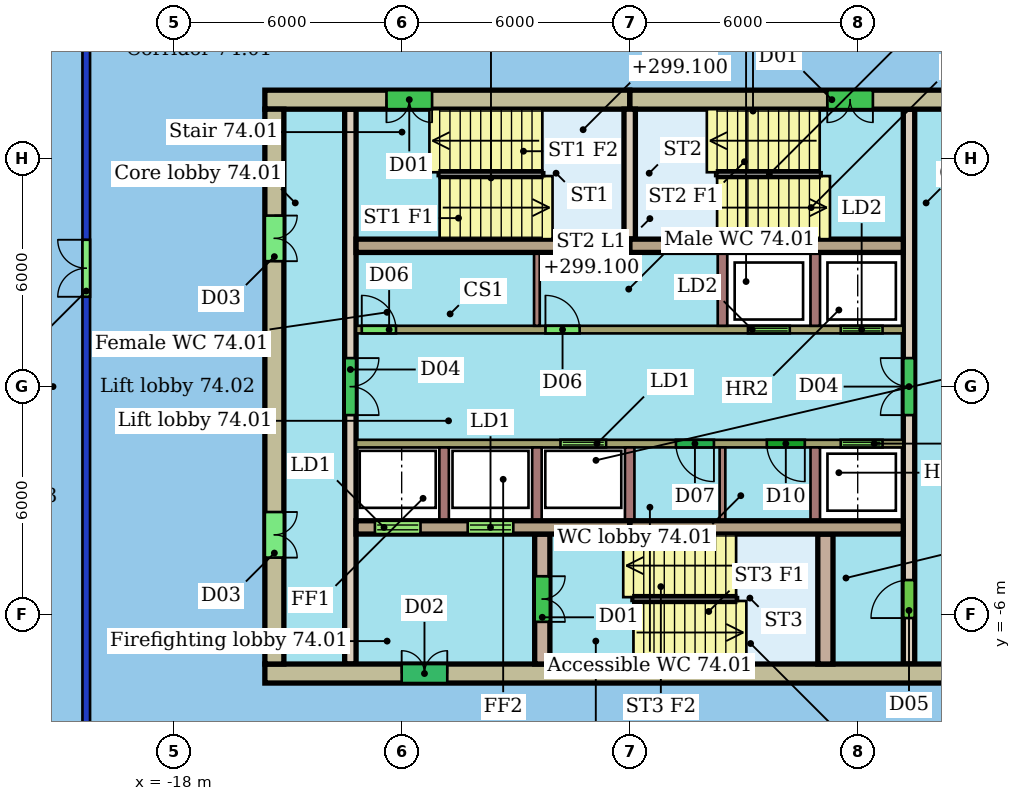
"""IFC4 building model, lengths in metres.
Left out: names, types, materials, properties, quantities, classifications, styles, units other than length and angle.
Written with IfcOpenShell. Run it as: python <this file> out.ifc"""

import sys

from ifc_helpers import new_model, si_unit, direction, frame, frame_2d, origin, place, context, subcontext, project, spatial, rectangle, extrude, element, fill, save


model = new_model("IFC4")
c1 = context("Model", 3, precision=1e-05, world=origin(), true_north=direction((0.0, 1.0)))
c2 = subcontext(c1, "Body", "Model", "MODEL_VIEW")
j1 = project(units=[si_unit("LENGTHUNIT", "METRE"), si_unit("PLANEANGLEUNIT", "RADIAN")], contexts=[c1])
p1 = place(None, origin())
s1 = spatial("IfcSite", under=j1, at=p1, CompositionType="ELEMENT")
p2 = place(p1, origin())
s2 = spatial("IfcBuilding", under=s1, at=p2, CompositionType="ELEMENT")
p3 = place(p2, frame((0.0, 0.0, 297.3)))
s3 = spatial("IfcBuildingStorey", under=s2, at=p3, CompositionType="ELEMENT", Elevation=297.3)
p4 = place(p3, frame((-20.3, -9.8, 0.0), z_axis=(0.0, 0.0, 1.0), x_axis=(0.0, 1.0, 0.0)))
e1 = element("IfcWall", 1, at=p4, inside=s3, PredefinedType="PARTITIONING", context=c2, shape_type="SweptSolid", body=[
    extrude(rectangle(XDim=19.6, YDim=0.2, at=frame_2d((9.8, 0.0))), origin(), (0.0, 0.0, 1.0), 3.1),
])
p5 = place(p4, frame((12.164, 0.0, 0.0)))
e2 = element("IfcOpeningElement", 2, at=p5, cuts=e1, PredefinedType="OPENING", context=c2, shape_type="SweptSolid", body=[
    extrude(rectangle(XDim=1.5, YDim=2.4, at=frame_2d((0.75, 1.2))), frame((0.0, 0.11, 0.0), z_axis=(0.0, -1.0, 0.0), x_axis=(1.0, 0.0, 0.0)), (0.0, 0.0, 1.0), 0.22),
])
p6 = place(p3, frame((3.6, 7.55, 0.0), z_axis=(0.0, 0.0, 1.0), x_axis=(-1.0, 0.0, 0.0)))
e3 = element("IfcWall", 3, at=p6, inside=s3, PredefinedType="SHEAR", context=c2, shape_type="SweptSolid", body=[
    extrude(rectangle(XDim=9.6, YDim=0.5, at=frame_2d((4.8, 0.0))), origin(), (0.0, 0.0, 1.0), 3.3),
])
p7 = place(p6, frame((3.2, 0.0, 0.0)))
e4 = element("IfcOpeningElement", 4, at=p7, cuts=e3, PredefinedType="OPENING", context=c2, shape_type="SweptSolid", body=[
    extrude(rectangle(XDim=1.2, YDim=2.1, at=frame_2d((0.6, 1.05))), frame((0.0, 0.26, 0.0), z_axis=(0.0, -1.0, 0.0), x_axis=(1.0, 0.0, 0.0)), (0.0, 0.0, 1.0), 0.52),
])
p8 = place(p3, frame((-6.0, 7.55, 0.0), z_axis=(0.0, 0.0, 1.0), x_axis=(-1.0, 0.0, 0.0)))
e5 = element("IfcWall", 5, at=p8, inside=s3, PredefinedType="SHEAR", context=c2, shape_type="SweptSolid", body=[
    extrude(rectangle(XDim=9.6, YDim=0.5, at=frame_2d((4.8, 0.0))), origin(), (0.0, 0.0, 1.0), 3.3),
])
p9 = place(p8, frame((5.2, 0.0, 0.0)))
e6 = element("IfcOpeningElement", 6, at=p9, cuts=e5, PredefinedType="OPENING", context=c2, shape_type="SweptSolid", body=[
    extrude(rectangle(XDim=1.2, YDim=2.1, at=frame_2d((0.6, 1.05))), frame((0.0, 0.26, 0.0), z_axis=(0.0, -1.0, 0.0), x_axis=(1.0, 0.0, 0.0)), (0.0, 0.0, 1.0), 0.52),
])
p10 = place(p3, frame((-15.6, -7.55, 0.0), z_axis=(0.0, 0.0, 1.0), x_axis=(1.0, 0.0, 0.0)))
e7 = element("IfcWall", 7, at=p10, inside=s3, PredefinedType="SHEAR", context=c2, shape_type="SweptSolid", body=[
    extrude(rectangle(XDim=19.2, YDim=0.5, at=frame_2d((9.6, 0.0))), origin(), (0.0, 0.0, 1.0), 3.3),
])
p11 = place(p10, frame((3.6, 0.0, 0.0)))
e8 = element("IfcOpeningElement", 8, at=p11, cuts=e7, PredefinedType="OPENING", context=c2, shape_type="SweptSolid", body=[
    extrude(rectangle(XDim=1.2, YDim=2.1, at=frame_2d((0.6, 1.05))), frame((0.0, 0.26, 0.0), z_axis=(0.0, -1.0, 0.0), x_axis=(1.0, 0.0, 0.0)), (0.0, 0.0, 1.0), 0.52),
])
p12 = place(p3, frame((-15.35, 7.3, 0.0), z_axis=(0.0, 0.0, 1.0), x_axis=(0.0, -1.0, 0.0)))
e9 = element("IfcWall", 9, at=p12, inside=s3, PredefinedType="SHEAR", context=c2, shape_type="SweptSolid", body=[
    extrude(rectangle(XDim=14.6, YDim=0.5, at=frame_2d((7.3, 0.0))), origin(), (0.0, 0.0, 1.0), 3.3),
])
p13 = place(p12, frame((10.6, 0.0, 0.0)))
e10 = element("IfcOpeningElement", 10, at=p13, cuts=e9, PredefinedType="OPENING", context=c2, shape_type="SweptSolid", body=[
    extrude(rectangle(XDim=1.2, YDim=2.1, at=frame_2d((0.6, 1.05))), frame((0.0, 0.26, 0.0), z_axis=(0.0, -1.0, 0.0), x_axis=(1.0, 0.0, 0.0)), (0.0, 0.0, 1.0), 0.52),
])
p14 = place(p12, frame((2.8, 0.0, 0.0)))
e11 = element("IfcOpeningElement", 11, at=p14, cuts=e9, PredefinedType="OPENING", context=c2, shape_type="SweptSolid", body=[
    extrude(rectangle(XDim=1.2, YDim=2.1, at=frame_2d((0.6, 1.05))), frame((0.0, 0.26, 0.0), z_axis=(0.0, -1.0, 0.0), x_axis=(1.0, 0.0, 0.0)), (0.0, 0.0, 1.0), 0.52),
])
for number, where, z_axis, x_axis in (
    (12, (-13.2, 3.705, 0.0), (0.0, 0.0, 1.0), (1.0, 0.0, 0.0)),
    (13, (-6.0, 3.705, 0.0), (0.0, 0.0, 1.0), (1.0, 0.0, 0.0)),
):
    element("IfcWall", number, at=place(p3, frame(where, z_axis=z_axis, x_axis=x_axis)), inside=s3, PredefinedType="SHEAR", context=c2, shape_type="SweptSolid", body=[
        extrude(rectangle(XDim=7.2, YDim=0.35, at=frame_2d((3.6, 0.0))), origin(), (0.0, 0.0, 1.0), 3.3),
    ])
p15 = place(p3, frame((-13.2, -3.705, 0.0), z_axis=(0.0, 0.0, 1.0), x_axis=(1.0, 0.0, 0.0)))
e14 = element("IfcWall", 14, at=p15, inside=s3, PredefinedType="SHEAR", context=c2, shape_type="SweptSolid", body=[
    extrude(rectangle(XDim=7.2, YDim=0.35, at=frame_2d((3.6, 0.0))), origin(), (0.0, 0.0, 1.0), 3.3),
])
p16 = place(p15, frame((0.496, 0.0, 0.0)))
e15 = element("IfcOpeningElement", 15, at=p16, cuts=e14, PredefinedType="OPENING", context=c2, shape_type="SweptSolid", body=[
    extrude(rectangle(XDim=1.2, YDim=2.1, at=frame_2d((0.6, 1.05))), frame((0.0, 0.185, 0.0), z_axis=(0.0, -1.0, 0.0), x_axis=(1.0, 0.0, 0.0)), (0.0, 0.0, 1.0), 0.37),
])
p17 = place(p15, frame((2.938, 0.0, 0.0)))
e16 = element("IfcOpeningElement", 16, at=p17, cuts=e14, PredefinedType="OPENING", context=c2, shape_type="SweptSolid", body=[
    extrude(rectangle(XDim=1.2, YDim=2.1, at=frame_2d((0.6, 1.05))), frame((0.0, 0.185, 0.0), z_axis=(0.0, -1.0, 0.0), x_axis=(1.0, 0.0, 0.0)), (0.0, 0.0, 1.0), 0.37),
])
p18 = place(p3, frame((-6.0, -3.705, 0.0), z_axis=(0.0, 0.0, 1.0), x_axis=(1.0, 0.0, 0.0)))
e17 = element("IfcWall", 17, at=p18, inside=s3, PredefinedType="SHEAR", context=c2, shape_type="SweptSolid", body=[
    extrude(rectangle(XDim=7.2, YDim=0.35, at=frame_2d((3.6, 0.0))), origin(), (0.0, 0.0, 1.0), 3.3),
])
p19 = place(p3, frame((-13.35, 7.3, 0.0), z_axis=(0.0, 0.0, 1.0), x_axis=(0.0, -1.0, 0.0)))
e18 = element("IfcWall", 18, at=p19, inside=s3, PredefinedType="SHEAR", context=c2, shape_type="SweptSolid", body=[
    extrude(rectangle(XDim=14.6, YDim=0.3, at=frame_2d((7.3, 0.0))), origin(), (0.0, 0.0, 1.0), 3.3),
])
p20 = place(p19, frame((6.55, 0.0, 0.0)))
e19 = element("IfcOpeningElement", 19, at=p20, cuts=e18, PredefinedType="OPENING", context=c2, shape_type="SweptSolid", body=[
    extrude(rectangle(XDim=1.5, YDim=2.1, at=frame_2d((0.75, 1.05))), frame((0.0, 0.16, 0.0), z_axis=(0.0, -1.0, 0.0), x_axis=(1.0, 0.0, 0.0)), (0.0, 0.0, 1.0), 0.32),
])
p21 = place(p3, frame((1.35, -7.3, 0.0), z_axis=(0.0, 0.0, 1.0), x_axis=(0.0, 1.0, 0.0)))
e20 = element("IfcWall", 20, at=p21, inside=s3, PredefinedType="SHEAR", context=c2, shape_type="SweptSolid", body=[
    extrude(rectangle(XDim=14.6, YDim=0.3, at=frame_2d((7.3, 0.0))), origin(), (0.0, 0.0, 1.0), 3.3),
])
p22 = place(p21, frame((1.21, 0.0, 0.0)))
e21 = element("IfcOpeningElement", 21, at=p22, cuts=e20, PredefinedType="OPENING", context=c2, shape_type="SweptSolid", body=[
    extrude(rectangle(XDim=1.0, YDim=2.1, at=frame_2d((0.5, 1.05))), frame((0.0, 0.16, 0.0), z_axis=(0.0, -1.0, 0.0), x_axis=(1.0, 0.0, 0.0)), (0.0, 0.0, 1.0), 0.32),
])
p23 = place(p21, frame((6.55, 0.0, 0.0)))
e22 = element("IfcOpeningElement", 22, at=p23, cuts=e20, PredefinedType="OPENING", context=c2, shape_type="SweptSolid", body=[
    extrude(rectangle(XDim=1.5, YDim=2.1, at=frame_2d((0.75, 1.05))), frame((0.0, 0.16, 0.0), z_axis=(0.0, -1.0, 0.0), x_axis=(1.0, 0.0, 0.0)), (0.0, 0.0, 1.0), 0.32),
])
p24 = place(p3, frame((-13.2, 1.5, 0.0), z_axis=(0.0, 0.0, 1.0), x_axis=(1.0, 0.0, 0.0)))
e23 = element("IfcWall", 23, at=p24, inside=s3, PredefinedType="SHEAR", context=c2, shape_type="SweptSolid", body=[
    extrude(rectangle(XDim=14.4, YDim=0.2, at=frame_2d((7.2, 0.0))), origin(), (0.0, 0.0, 1.0), 3.3),
])
p25 = place(p24, frame((10.312, 0.0, 0.0)))
e24 = element("IfcOpeningElement", 24, at=p25, cuts=e23, PredefinedType="OPENING", context=c2, shape_type="SweptSolid", body=[
    extrude(rectangle(XDim=1.1, YDim=2.1, at=frame_2d((0.55, 1.05))), frame((0.0, 0.11, 0.0), z_axis=(0.0, -1.0, 0.0), x_axis=(1.0, 0.0, 0.0)), (0.0, 0.0, 1.0), 0.22),
])
p26 = place(p24, frame((12.754, 0.0, 0.0)))
e25 = element("IfcOpeningElement", 25, at=p26, cuts=e23, PredefinedType="OPENING", context=c2, shape_type="SweptSolid", body=[
    extrude(rectangle(XDim=1.1, YDim=2.1, at=frame_2d((0.55, 1.05))), frame((0.0, 0.11, 0.0), z_axis=(0.0, -1.0, 0.0), x_axis=(1.0, 0.0, 0.0)), (0.0, 0.0, 1.0), 0.22),
])
p27 = place(p24, frame((0.15, 0.0, 0.0)))
e26 = element("IfcOpeningElement", 26, at=p27, cuts=e23, PredefinedType="OPENING", context=c2, shape_type="SweptSolid", body=[
    extrude(rectangle(XDim=0.9, YDim=2.1, at=frame_2d((0.45, 1.05))), frame((0.0, 0.11, 0.0), z_axis=(0.0, -1.0, 0.0), x_axis=(1.0, 0.0, 0.0)), (0.0, 0.0, 1.0), 0.22),
])
p28 = place(p24, frame((4.983, 0.0, 0.0)))
e27 = element("IfcOpeningElement", 27, at=p28, cuts=e23, PredefinedType="OPENING", context=c2, shape_type="SweptSolid", body=[
    extrude(rectangle(XDim=0.9, YDim=2.1, at=frame_2d((0.45, 1.05))), frame((0.0, 0.11, 0.0), z_axis=(0.0, -1.0, 0.0), x_axis=(1.0, 0.0, 0.0)), (0.0, 0.0, 1.0), 0.22),
])
p29 = place(p3, frame((1.2, -1.5, 0.0), z_axis=(0.0, 0.0, 1.0), x_axis=(-1.0, 0.0, 0.0)))
e28 = element("IfcWall", 28, at=p29, inside=s3, PredefinedType="SHEAR", context=c2, shape_type="SweptSolid", body=[
    extrude(rectangle(XDim=14.4, YDim=0.2, at=frame_2d((7.2, 0.0))), origin(), (0.0, 0.0, 1.0), 3.3),
])
p30 = place(p29, frame((7.821, 0.0, 0.0)))
e29 = element("IfcOpeningElement", 29, at=p30, cuts=e28, PredefinedType="OPENING", context=c2, shape_type="SweptSolid", body=[
    extrude(rectangle(XDim=1.2, YDim=2.1, at=frame_2d((0.6, 1.05))), frame((0.0, 0.11, 0.0), z_axis=(0.0, -1.0, 0.0), x_axis=(1.0, 0.0, 0.0)), (0.0, 0.0, 1.0), 0.22),
])
p31 = place(p29, frame((0.546, 0.0, 0.0)))
e30 = element("IfcOpeningElement", 30, at=p31, cuts=e28, PredefinedType="OPENING", context=c2, shape_type="SweptSolid", body=[
    extrude(rectangle(XDim=1.1, YDim=2.1, at=frame_2d((0.55, 1.05))), frame((0.0, 0.11, 0.0), z_axis=(0.0, -1.0, 0.0), x_axis=(1.0, 0.0, 0.0)), (0.0, 0.0, 1.0), 0.22),
])
p32 = place(p29, frame((4.983, 0.0, 0.0)))
e31 = element("IfcOpeningElement", 31, at=p32, cuts=e28, PredefinedType="OPENING", context=c2, shape_type="SweptSolid", body=[
    extrude(rectangle(XDim=1.0, YDim=2.1, at=frame_2d((0.5, 1.05))), frame((0.0, 0.11, 0.0), z_axis=(0.0, -1.0, 0.0), x_axis=(1.0, 0.0, 0.0)), (0.0, 0.0, 1.0), 0.22),
])
p33 = place(p29, frame((2.592, 0.0, 0.0)))
e32 = element("IfcOpeningElement", 32, at=p33, cuts=e28, PredefinedType="OPENING", context=c2, shape_type="SweptSolid", body=[
    extrude(rectangle(XDim=1.0, YDim=2.1, at=frame_2d((0.5, 1.05))), frame((0.0, 0.11, 0.0), z_axis=(0.0, -1.0, 0.0), x_axis=(1.0, 0.0, 0.0)), (0.0, 0.0, 1.0), 0.22),
])
p34 = place(p3, frame((-8.3, -3.88, 0.0), z_axis=(0.0, 0.0, 1.0), x_axis=(0.0, -1.0, 0.0)))
e33 = element("IfcWall", 33, at=p34, inside=s3, PredefinedType="SHEAR", context=c2, shape_type="SweptSolid", body=[
    extrude(rectangle(XDim=3.42, YDim=0.4, at=frame_2d((1.71, 0.0))), origin(), (0.0, 0.0, 1.0), 3.3),
])
p35 = place(p34, frame((1.11, 0.0, 0.0)))
e34 = element("IfcOpeningElement", 34, at=p35, cuts=e33, PredefinedType="OPENING", context=c2, shape_type="SweptSolid", body=[
    extrude(rectangle(XDim=1.2, YDim=2.1, at=frame_2d((0.6, 1.05))), frame((0.0, 0.21, 0.0), z_axis=(0.0, -1.0, 0.0), x_axis=(1.0, 0.0, 0.0)), (0.0, 0.0, 1.0), 0.42),
])
p36 = place(p3, frame((-0.85, -3.88, 0.0), z_axis=(0.0, 0.0, 1.0), x_axis=(0.0, -1.0, 0.0)))
e35 = element("IfcWall", 35, at=p36, inside=s3, PredefinedType="SHEAR", context=c2, shape_type="SweptSolid", body=[
    extrude(rectangle(XDim=3.42, YDim=0.4, at=frame_2d((1.71, 0.0))), origin(), (0.0, 0.0, 1.0), 3.3),
])
p37 = place(p3, frame((-6.0, 3.88, 0.0), z_axis=(0.0, 0.0, 1.0), x_axis=(0.0, 1.0, 0.0)))
e36 = element("IfcWall", 36, at=p37, inside=s3, PredefinedType="SHEAR", context=c2, shape_type="SweptSolid", body=[
    extrude(rectangle(XDim=3.42, YDim=0.3, at=frame_2d((1.71, 0.0))), origin(), (0.0, 0.0, 1.0), 3.3),
])
for number, where, z_axis, x_axis in (
    (37, (-3.558, 1.6, 0.0), (0.0, 0.0, 1.0), (0.0, 1.0, 0.0)),
    (38, (-1.117, 1.6, 0.0), (0.0, 0.0, 1.0), (0.0, 1.0, 0.0)),
):
    element("IfcWall", number, at=place(p3, frame(where, z_axis=z_axis, x_axis=x_axis)), inside=s3, PredefinedType="SHEAR", context=c2, shape_type="SweptSolid", body=[
        extrude(rectangle(XDim=1.93, YDim=0.25, at=frame_2d((0.965, 0.0))), origin(), (0.0, 0.0, 1.0), 3.3),
    ])
p38 = place(p3, frame((-8.442, 1.6, 0.0), z_axis=(0.0, 0.0, 1.0), x_axis=(0.0, 1.0, 0.0)))
e39 = element("IfcWall", 39, at=p38, inside=s3, PredefinedType="PARTITIONING", context=c2, shape_type="SweptSolid", body=[
    extrude(rectangle(XDim=1.93, YDim=0.15, at=frame_2d((0.965, 0.0))), origin(), (0.0, 0.0, 1.0), 3.3),
])
for number, where, z_axis, x_axis in (
    (40, (-10.883, -1.6, 0.0), (0.0, 0.0, 1.0), (0.0, -1.0, 0.0)),
    (41, (-8.442, -1.6, 0.0), (0.0, 0.0, 1.0), (0.0, -1.0, 0.0)),
    (42, (-6.0, -1.6, 0.0), (0.0, 0.0, 1.0), (0.0, -1.0, 0.0)),
    (43, (-1.117, -1.6, 0.0), (0.0, 0.0, 1.0), (0.0, -1.0, 0.0)),
):
    element("IfcWall", number, at=place(p3, frame(where, z_axis=z_axis, x_axis=x_axis)), inside=s3, PredefinedType="SHEAR", context=c2, shape_type="SweptSolid", body=[
        extrude(rectangle(XDim=1.93, YDim=0.25, at=frame_2d((0.965, 0.0))), origin(), (0.0, 0.0, 1.0), 3.3),
    ])
p39 = place(p3, frame((-3.558, -1.6, 0.0), z_axis=(0.0, 0.0, 1.0), x_axis=(0.0, -1.0, 0.0)))
e44 = element("IfcWall", 44, at=p39, inside=s3, PredefinedType="PARTITIONING", context=c2, shape_type="SweptSolid", body=[
    extrude(rectangle(XDim=1.93, YDim=0.15, at=frame_2d((0.965, 0.0))), origin(), (0.0, 0.0, 1.0), 3.3),
])
p40 = place(p5, origin())
e45 = element("IfcDoor", 45, at=p40, inside=s3, OperationType="DOUBLE_DOOR_SINGLE_SWING", PredefinedType="DOOR", context=c2, shape_type="SweptSolid", body=[
    extrude(rectangle(XDim=1.5, YDim=2.4, at=frame_2d((0.75, 1.2))), frame((0.0, 0.025, 0.0), z_axis=(0.0, -1.0, 0.0), x_axis=(1.0, 0.0, 0.0)), (0.0, 0.0, 1.0), 0.05),
])
fill(e2, e45)
p41 = place(p7, origin())
e46 = element("IfcDoor", 46, at=p41, inside=s3, OperationType="DOUBLE_DOOR_SINGLE_SWING", PredefinedType="NOTDEFINED", context=c2, shape_type="SweptSolid", body=[
    extrude(rectangle(XDim=1.2, YDim=2.1, at=frame_2d((0.6, 1.05))), frame((0.0, 0.025, 0.0), z_axis=(0.0, -1.0, 0.0), x_axis=(1.0, 0.0, 0.0)), (0.0, 0.0, 1.0), 0.05),
])
fill(e4, e46)
p42 = place(p9, origin())
e47 = element("IfcDoor", 47, at=p42, inside=s3, OperationType="DOUBLE_DOOR_SINGLE_SWING", PredefinedType="NOTDEFINED", context=c2, shape_type="SweptSolid", body=[
    extrude(rectangle(XDim=1.2, YDim=2.1, at=frame_2d((0.6, 1.05))), frame((0.0, 0.025, 0.0), z_axis=(0.0, -1.0, 0.0), x_axis=(1.0, 0.0, 0.0)), (0.0, 0.0, 1.0), 0.05),
])
fill(e6, e47)
p43 = place(p11, origin())
e48 = element("IfcDoor", 48, at=p43, inside=s3, OperationType="DOUBLE_DOOR_SINGLE_SWING", PredefinedType="NOTDEFINED", context=c2, shape_type="SweptSolid", body=[
    extrude(rectangle(XDim=1.2, YDim=2.1, at=frame_2d((0.6, 1.05))), frame((0.0, 0.025, 0.0), z_axis=(0.0, -1.0, 0.0), x_axis=(1.0, 0.0, 0.0)), (0.0, 0.0, 1.0), 0.05),
])
fill(e8, e48)
p44 = place(p13, origin())
e49 = element("IfcDoor", 49, at=p44, inside=s3, OperationType="DOUBLE_DOOR_SINGLE_SWING", PredefinedType="NOTDEFINED", context=c2, shape_type="SweptSolid", body=[
    extrude(rectangle(XDim=1.2, YDim=2.1, at=frame_2d((0.6, 1.05))), frame((0.0, 0.025, 0.0), z_axis=(0.0, -1.0, 0.0), x_axis=(1.0, 0.0, 0.0)), (0.0, 0.0, 1.0), 0.05),
])
fill(e10, e49)
p45 = place(p14, origin())
e50 = element("IfcDoor", 50, at=p45, inside=s3, OperationType="DOUBLE_DOOR_SINGLE_SWING", PredefinedType="NOTDEFINED", context=c2, shape_type="SweptSolid", body=[
    extrude(rectangle(XDim=1.2, YDim=2.1, at=frame_2d((0.6, 1.05))), frame((0.0, 0.025, 0.0), z_axis=(0.0, -1.0, 0.0), x_axis=(1.0, 0.0, 0.0)), (0.0, 0.0, 1.0), 0.05),
])
fill(e11, e50)
p46 = place(p16, origin())
e51 = element("IfcDoor", 51, at=p46, inside=s3, OperationType="DOUBLE_DOOR_SLIDING", PredefinedType="NOTDEFINED", context=c2, shape_type="SweptSolid", body=[
    extrude(rectangle(XDim=1.2, YDim=2.1, at=frame_2d((0.6, 1.05))), frame((0.0, 0.025, 0.0), z_axis=(0.0, -1.0, 0.0), x_axis=(1.0, 0.0, 0.0)), (0.0, 0.0, 1.0), 0.05),
])
fill(e15, e51)
p47 = place(p17, origin())
e52 = element("IfcDoor", 52, at=p47, inside=s3, OperationType="DOUBLE_DOOR_SLIDING", PredefinedType="NOTDEFINED", context=c2, shape_type="SweptSolid", body=[
    extrude(rectangle(XDim=1.2, YDim=2.1, at=frame_2d((0.6, 1.05))), frame((0.0, 0.025, 0.0), z_axis=(0.0, -1.0, 0.0), x_axis=(1.0, 0.0, 0.0)), (0.0, 0.0, 1.0), 0.05),
])
fill(e16, e52)
p48 = place(p20, origin())
e53 = element("IfcDoor", 53, at=p48, inside=s3, OperationType="DOUBLE_DOOR_SINGLE_SWING", PredefinedType="NOTDEFINED", context=c2, shape_type="SweptSolid", body=[
    extrude(rectangle(XDim=1.5, YDim=2.1, at=frame_2d((0.75, 1.05))), frame((0.0, 0.025, 0.0), z_axis=(0.0, -1.0, 0.0), x_axis=(1.0, 0.0, 0.0)), (0.0, 0.0, 1.0), 0.05),
])
fill(e19, e53)
p49 = place(p22, origin())
e54 = element("IfcDoor", 54, at=p49, inside=s3, OperationType="SINGLE_SWING_LEFT", PredefinedType="NOTDEFINED", context=c2, shape_type="SweptSolid", body=[
    extrude(rectangle(XDim=1.0, YDim=2.1, at=frame_2d((0.5, 1.05))), frame((0.0, 0.025, 0.0), z_axis=(0.0, -1.0, 0.0), x_axis=(1.0, 0.0, 0.0)), (0.0, 0.0, 1.0), 0.05),
])
fill(e21, e54)
p50 = place(p23, origin())
e55 = element("IfcDoor", 55, at=p50, inside=s3, OperationType="DOUBLE_DOOR_SINGLE_SWING", PredefinedType="NOTDEFINED", context=c2, shape_type="SweptSolid", body=[
    extrude(rectangle(XDim=1.5, YDim=2.1, at=frame_2d((0.75, 1.05))), frame((0.0, 0.025, 0.0), z_axis=(0.0, -1.0, 0.0), x_axis=(1.0, 0.0, 0.0)), (0.0, 0.0, 1.0), 0.05),
])
fill(e22, e55)
p51 = place(p25, origin())
e56 = element("IfcDoor", 56, at=p51, inside=s3, OperationType="DOUBLE_DOOR_SLIDING", PredefinedType="NOTDEFINED", context=c2, shape_type="SweptSolid", body=[
    extrude(rectangle(XDim=1.1, YDim=2.1, at=frame_2d((0.55, 1.05))), frame((0.0, 0.025, 0.0), z_axis=(0.0, -1.0, 0.0), x_axis=(1.0, 0.0, 0.0)), (0.0, 0.0, 1.0), 0.05),
])
fill(e24, e56)
p52 = place(p26, origin())
e57 = element("IfcDoor", 57, at=p52, inside=s3, OperationType="DOUBLE_DOOR_SLIDING", PredefinedType="NOTDEFINED", context=c2, shape_type="SweptSolid", body=[
    extrude(rectangle(XDim=1.1, YDim=2.1, at=frame_2d((0.55, 1.05))), frame((0.0, 0.025, 0.0), z_axis=(0.0, -1.0, 0.0), x_axis=(1.0, 0.0, 0.0)), (0.0, 0.0, 1.0), 0.05),
])
fill(e25, e57)
p53 = place(p27, origin())
e58 = element("IfcDoor", 58, at=p53, inside=s3, OperationType="SINGLE_SWING_LEFT", PredefinedType="NOTDEFINED", context=c2, shape_type="SweptSolid", body=[
    extrude(rectangle(XDim=0.9, YDim=2.1, at=frame_2d((0.45, 1.05))), frame((0.0, 0.025, 0.0), z_axis=(0.0, -1.0, 0.0), x_axis=(1.0, 0.0, 0.0)), (0.0, 0.0, 1.0), 0.05),
])
fill(e26, e58)
p54 = place(p28, origin())
e59 = element("IfcDoor", 59, at=p54, inside=s3, OperationType="SINGLE_SWING_LEFT", PredefinedType="NOTDEFINED", context=c2, shape_type="SweptSolid", body=[
    extrude(rectangle(XDim=0.9, YDim=2.1, at=frame_2d((0.45, 1.05))), frame((0.0, 0.025, 0.0), z_axis=(0.0, -1.0, 0.0), x_axis=(1.0, 0.0, 0.0)), (0.0, 0.0, 1.0), 0.05),
])
fill(e27, e59)
p55 = place(p30, origin())
e60 = element("IfcDoor", 60, at=p55, inside=s3, OperationType="DOUBLE_DOOR_SLIDING", PredefinedType="NOTDEFINED", context=c2, shape_type="SweptSolid", body=[
    extrude(rectangle(XDim=1.2, YDim=2.1, at=frame_2d((0.6, 1.05))), frame((0.0, 0.025, 0.0), z_axis=(0.0, -1.0, 0.0), x_axis=(1.0, 0.0, 0.0)), (0.0, 0.0, 1.0), 0.05),
])
fill(e29, e60)
p56 = place(p31, origin())
e61 = element("IfcDoor", 61, at=p56, inside=s3, OperationType="DOUBLE_DOOR_SLIDING", PredefinedType="NOTDEFINED", context=c2, shape_type="SweptSolid", body=[
    extrude(rectangle(XDim=1.1, YDim=2.1, at=frame_2d((0.55, 1.05))), frame((0.0, 0.025, 0.0), z_axis=(0.0, -1.0, 0.0), x_axis=(1.0, 0.0, 0.0)), (0.0, 0.0, 1.0), 0.05),
])
fill(e30, e61)
p57 = place(p32, origin())
e62 = element("IfcDoor", 62, at=p57, inside=s3, OperationType="SINGLE_SWING_LEFT", PredefinedType="NOTDEFINED", context=c2, shape_type="SweptSolid", body=[
    extrude(rectangle(XDim=1.0, YDim=2.1, at=frame_2d((0.5, 1.05))), frame((0.0, 0.025, 0.0), z_axis=(0.0, -1.0, 0.0), x_axis=(1.0, 0.0, 0.0)), (0.0, 0.0, 1.0), 0.05),
])
fill(e31, e62)
p58 = place(p33, origin())
e63 = element("IfcDoor", 63, at=p58, inside=s3, OperationType="SINGLE_SWING_LEFT", PredefinedType="NOTDEFINED", context=c2, shape_type="SweptSolid", body=[
    extrude(rectangle(XDim=1.0, YDim=2.1, at=frame_2d((0.5, 1.05))), frame((0.0, 0.025, 0.0), z_axis=(0.0, -1.0, 0.0), x_axis=(1.0, 0.0, 0.0)), (0.0, 0.0, 1.0), 0.05),
])
fill(e32, e63)
p59 = place(p35, origin())
e64 = element("IfcDoor", 64, at=p59, inside=s3, OperationType="DOUBLE_DOOR_SINGLE_SWING", PredefinedType="NOTDEFINED", context=c2, shape_type="SweptSolid", body=[
    extrude(rectangle(XDim=1.2, YDim=2.1, at=frame_2d((0.6, 1.05))), frame((0.0, 0.025, 0.0), z_axis=(0.0, -1.0, 0.0), x_axis=(1.0, 0.0, 0.0)), (0.0, 0.0, 1.0), 0.05),
])
fill(e34, e64)
save(model, sys.argv[1])
